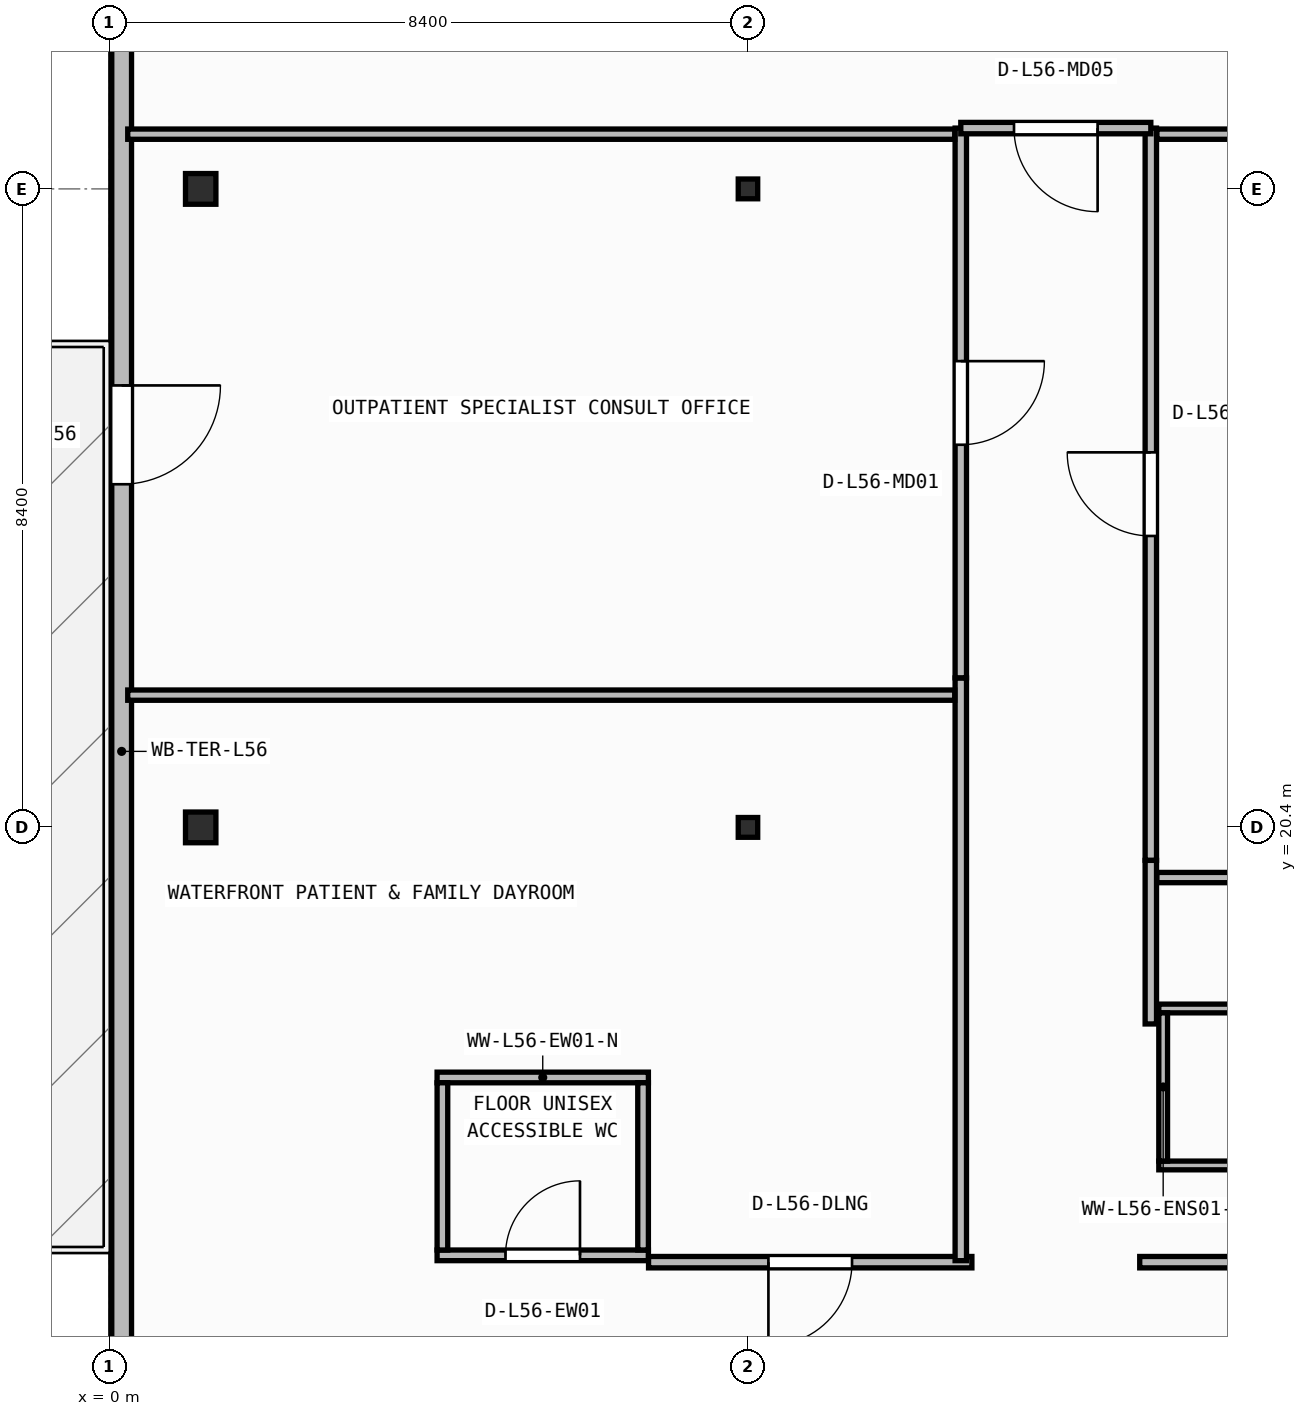
"""IFC4 building model, lengths in metres.
Left out: names, types, materials, properties, quantities, classifications, styles, units other than length and angle.
Written with IfcOpenShell. Run it as: python <this file> out.ifc"""

import sys

from ifc_helpers import new_model, si_unit, direction, frame, frame_2d, origin, origin_2d, place, context, subcontext, project, spatial, rectangle, i_section, extrude, element, fill, save


model = new_model("IFC4")
c1 = context("Model", 3, precision=1e-05, world=origin(), true_north=direction((0.0, 1.0)))
c2 = subcontext(c1, "Body", "Model", "MODEL_VIEW")
j1 = project(units=[si_unit("LENGTHUNIT", "METRE"), si_unit("PLANEANGLEUNIT", "RADIAN")], contexts=[c1])
p1 = place(None, origin())
s1 = spatial("IfcSite", under=j1, at=p1, CompositionType="ELEMENT")
p2 = place(p1, origin())
s2 = spatial("IfcBuilding", under=s1, at=p2, CompositionType="ELEMENT")
p3 = place(p2, frame((0.0, 0.0, 227.65)))
s3 = spatial("IfcBuildingStorey", under=s2, at=p3, CompositionType="ELEMENT", Elevation=227.65)
p4 = place(p3, frame((1.2, 20.4, 0.0), z_axis=(0.0, 0.0, 1.0), x_axis=(1.0, 0.0, 0.0)))
e1 = element("IfcColumn", 1, at=p4, inside=s3, PredefinedType="COLUMN", context=c2, shape_type="SweptSolid", body=[
    extrude(i_section(OverallWidth=0.4, OverallDepth=0.404, WebThickness=0.02, FlangeThickness=0.032, at=origin_2d()), origin(), (0.0, 0.0, 1.0), 3.95),
])
p5 = place(p3, frame((8.4, 20.4, 0.0), z_axis=(0.0, 0.0, 1.0), x_axis=(1.0, 0.0, 0.0)))
e2 = element("IfcColumn", 2, at=p5, inside=s3, PredefinedType="COLUMN", context=c2, shape_type="SweptSolid", body=[
    extrude(i_section(OverallWidth=0.256, OverallDepth=0.26, WebThickness=0.01, FlangeThickness=0.017, FilletRadius=0.013, at=origin_2d()), origin(), (0.0, 0.0, 1.0), 3.95),
])
p6 = place(p3, frame((1.2, 28.8, 0.0), z_axis=(0.0, 0.0, 1.0), x_axis=(1.0, 0.0, 0.0)))
e3 = element("IfcColumn", 3, at=p6, inside=s3, PredefinedType="COLUMN", context=c2, shape_type="SweptSolid", body=[
    extrude(i_section(OverallWidth=0.4, OverallDepth=0.404, WebThickness=0.02, FlangeThickness=0.032, at=origin_2d()), origin(), (0.0, 0.0, 1.0), 3.95),
])
p7 = place(p3, frame((8.4, 28.8, 0.0), z_axis=(0.0, 0.0, 1.0), x_axis=(1.0, 0.0, 0.0)))
e4 = element("IfcColumn", 4, at=p7, inside=s3, PredefinedType="COLUMN", context=c2, shape_type="SweptSolid", body=[
    extrude(i_section(OverallWidth=0.256, OverallDepth=0.26, WebThickness=0.01, FlangeThickness=0.017, FilletRadius=0.013, at=origin_2d()), origin(), (0.0, 0.0, 1.0), 3.95),
])
p8 = place(p3, frame((0.16, 40.14, 0.0), z_axis=(0.0, 0.0, 1.0), x_axis=(0.0, -1.0, 0.0)))
e5 = element("IfcWall", 5, at=p8, inside=s3, PredefinedType="STANDARD", context=c2, shape_type="SweptSolid", body=[
    extrude(rectangle(XDim=37.48, YDim=0.26, at=frame_2d((18.74, 0.0))), origin(), (0.0, 0.0, 1.0), 3.71),
])
p9 = place(p8, frame((13.926, 0.0, 0.0)))
e6 = element("IfcOpeningElement", 6, at=p9, cuts=e5, PredefinedType="OPENING", context=c2, shape_type="SweptSolid", body=[
    extrude(rectangle(XDim=1.3, YDim=2.15, at=frame_2d((0.65, 1.075))), frame((0.0, 0.14, 0.0), z_axis=(0.0, -1.0, 0.0), x_axis=(1.0, 0.0, 0.0)), (0.0, 0.0, 1.0), 0.28),
])
p10 = place(p3, frame((4.31, 14.77, 0.0), z_axis=(0.0, 0.0, 1.0), x_axis=(1.0, 0.0, 0.0)))
e7 = element("IfcWall", 7, at=p10, inside=s3, PredefinedType="PARTITIONING", context=c2, shape_type="SweptSolid", body=[
    extrude(rectangle(XDim=2.78, YDim=0.14, at=frame_2d((1.39, 0.0))), origin(), (0.0, 0.0, 1.0), 3.71),
])
p11 = place(p10, frame((0.9, 0.0, 0.0)))
e8 = element("IfcOpeningElement", 8, at=p11, cuts=e7, PredefinedType="OPENING", context=c2, shape_type="SweptSolid", body=[
    extrude(rectangle(XDim=0.98, YDim=2.1, at=frame_2d((0.49, 1.05))), frame((0.0, 0.08, 0.0), z_axis=(0.0, -1.0, 0.0), x_axis=(1.0, 0.0, 0.0)), (0.0, 0.0, 1.0), 0.16),
])
p12 = place(p3, frame((4.31, 17.11, 0.0), z_axis=(0.0, 0.0, 1.0), x_axis=(1.0, 0.0, 0.0)))
e9 = element("IfcWall", 9, at=p12, inside=s3, PredefinedType="PARTITIONING", context=c2, shape_type="SweptSolid", body=[
    extrude(rectangle(XDim=2.78, YDim=0.14, at=frame_2d((1.39, 0.0))), origin(), (0.0, 0.0, 1.0), 3.71),
])
for number, where, z_axis, x_axis in (
    (10, (4.38, 14.84, 0.0), (0.0, 0.0, 1.0), (0.0, 1.0, 0.0)),
    (11, (7.02, 14.84, 0.0), (0.0, 0.0, 1.0), (0.0, 1.0, 0.0)),
):
    element("IfcWall", number, at=place(p3, frame(where, z_axis=z_axis, x_axis=x_axis)), inside=s3, PredefinedType="PARTITIONING", context=c2, shape_type="SweptSolid", body=[
        extrude(rectangle(XDim=2.2, YDim=0.14, at=frame_2d((1.1, 0.0))), origin(), (0.0, 0.0, 1.0), 3.71),
    ])
for number, where, z_axis, x_axis in (
    (12, (13.805, 15.952, 0.0), (0.0, 0.0, 1.0), (1.0, 0.0, 0.0)),
    (13, (13.805, 18.018, 0.0), (0.0, 0.0, 1.0), (1.0, 0.0, 0.0)),
):
    element("IfcWall", number, at=place(p3, frame(where, z_axis=z_axis, x_axis=x_axis)), inside=s3, PredefinedType="PARTITIONING", context=c2, shape_type="SweptSolid", body=[
        extrude(rectangle(XDim=2.15, YDim=0.115, at=frame_2d((1.075, 0.0))), origin(), (0.0, 0.0, 1.0), 3.71),
    ])
p13 = place(p3, frame((13.863, 16.01, 0.0), z_axis=(0.0, 0.0, 1.0), x_axis=(0.0, 1.0, 0.0)))
e14 = element("IfcWall", 14, at=p13, inside=s3, PredefinedType="PARTITIONING", context=c2, shape_type="SweptSolid", body=[
    extrude(rectangle(XDim=1.95, YDim=0.115, at=frame_2d((0.975, 0.0))), origin(), (0.0, 0.0, 1.0), 3.71),
])
p14 = place(p3, frame((11.346, 14.68, 0.0), z_axis=(0.0, 0.0, 1.0), x_axis=(-1.0, 0.0, 0.0)))
e15 = element("IfcWall", 15, at=p14, inside=s3, PredefinedType="PARTITIONING", context=c2, shape_type="SweptSolid", body=[
    extrude(rectangle(XDim=4.254, YDim=0.15, at=frame_2d((2.127, 0.0))), origin(), (0.0, 0.0, 1.0), 3.71),
])
p15 = place(p14, frame((1.577, 0.0, 0.0)))
e16 = element("IfcOpeningElement", 16, at=p15, cuts=e15, PredefinedType="OPENING", context=c2, shape_type="SweptSolid", body=[
    extrude(rectangle(XDim=1.1, YDim=2.1, at=frame_2d((0.55, 1.05))), frame((0.0, 0.085, 0.0), z_axis=(0.0, -1.0, 0.0), x_axis=(1.0, 0.0, 0.0)), (0.0, 0.0, 1.0), 0.17),
])
p16 = place(p3, frame((18.266, 14.68, 0.0), z_axis=(0.0, 0.0, 1.0), x_axis=(-1.0, 0.0, 0.0)))
e17 = element("IfcWall", 17, at=p16, inside=s3, PredefinedType="PARTITIONING", context=c2, shape_type="SweptSolid", body=[
    extrude(rectangle(XDim=4.712, YDim=0.15, at=frame_2d((2.356, 0.0))), origin(), (0.0, 0.0, 1.0), 3.71),
])
p17 = place(p16, frame((1.706, 0.0, 0.0)))
e18 = element("IfcOpeningElement", 18, at=p17, cuts=e17, PredefinedType="OPENING", context=c2, shape_type="SweptSolid", body=[
    extrude(rectangle(XDim=1.3, YDim=2.15, at=frame_2d((0.65, 1.075))), frame((0.0, 0.085, 0.0), z_axis=(0.0, -1.0, 0.0), x_axis=(1.0, 0.0, 0.0)), (0.0, 0.0, 1.0), 0.17),
])
p18 = place(p3, frame((11.2, 22.366, 0.0), z_axis=(0.0, 0.0, 1.0), x_axis=(0.0, -1.0, 0.0)))
e19 = element("IfcWall", 19, at=p18, inside=s3, PredefinedType="PARTITIONING", context=c2, shape_type="SweptSolid", body=[
    extrude(rectangle(XDim=7.666, YDim=0.15, at=frame_2d((3.833, 0.0))), origin(), (0.0, 0.0, 1.0), 3.71),
])
p19 = place(p3, frame((11.2, 29.6, 0.0), z_axis=(0.0, 0.0, 1.0), x_axis=(0.0, -1.0, 0.0)))
e20 = element("IfcWall", 20, at=p19, inside=s3, PredefinedType="PARTITIONING", context=c2, shape_type="SweptSolid", body=[
    extrude(rectangle(XDim=7.232, YDim=0.15, at=frame_2d((3.616, 0.0))), origin(), (0.0, 0.0, 1.0), 3.71),
])
p20 = place(p19, frame((3.066, 0.0, 0.0)))
e21 = element("IfcOpeningElement", 21, at=p20, cuts=e20, PredefinedType="OPENING", context=c2, shape_type="SweptSolid", body=[
    extrude(rectangle(XDim=1.1, YDim=2.1, at=frame_2d((0.55, 1.05))), frame((0.0, 0.085, 0.0), z_axis=(0.0, -1.0, 0.0), x_axis=(1.0, 0.0, 0.0)), (0.0, 0.0, 1.0), 0.17),
])
p21 = place(p3, frame((13.7, 17.814, 0.0), z_axis=(0.0, 0.0, 1.0), x_axis=(0.0, 1.0, 0.0)))
e22 = element("IfcWall", 22, at=p21, inside=s3, PredefinedType="PARTITIONING", context=c2, shape_type="SweptSolid", body=[
    extrude(rectangle(XDim=2.152, YDim=0.15, at=frame_2d((1.076, 0.0))), origin(), (0.0, 0.0, 1.0), 3.71),
])
p22 = place(p3, frame((13.7, 19.968, 0.0), z_axis=(0.0, 0.0, 1.0), x_axis=(0.0, 1.0, 0.0)))
e23 = element("IfcWall", 23, at=p22, inside=s3, PredefinedType="PARTITIONING", context=c2, shape_type="SweptSolid", body=[
    extrude(rectangle(XDim=9.632, YDim=0.15, at=frame_2d((4.816, 0.0))), origin(), (0.0, 0.0, 1.0), 3.71),
])
p23 = place(p22, frame((4.266, 0.0, 0.0)))
e24 = element("IfcOpeningElement", 24, at=p23, cuts=e23, PredefinedType="OPENING", context=c2, shape_type="SweptSolid", body=[
    extrude(rectangle(XDim=1.1, YDim=2.1, at=frame_2d((0.55, 1.05))), frame((0.0, 0.085, 0.0), z_axis=(0.0, -1.0, 0.0), x_axis=(1.0, 0.0, 0.0)), (0.0, 0.0, 1.0), 0.17),
])
p24 = place(p3, frame((13.7, 29.6, 0.0), z_axis=(0.0, 0.0, 1.0), x_axis=(-1.0, 0.0, 0.0)))
e25 = element("IfcWall", 25, at=p24, inside=s3, PredefinedType="PARTITIONING", context=c2, shape_type="SweptSolid", body=[
    extrude(rectangle(XDim=2.5, YDim=0.15, at=frame_2d((1.25, 0.0))), origin(), (0.0, 0.0, 1.0), 3.71),
])
p25 = place(p24, frame((0.7, 0.0, 0.0)))
e26 = element("IfcOpeningElement", 26, at=p25, cuts=e25, PredefinedType="OPENING", context=c2, shape_type="SweptSolid", body=[
    extrude(rectangle(XDim=1.1, YDim=2.1, at=frame_2d((0.55, 1.05))), frame((0.0, 0.085, 0.0), z_axis=(0.0, -1.0, 0.0), x_axis=(1.0, 0.0, 0.0)), (0.0, 0.0, 1.0), 0.17),
])
for number, where, z_axis, x_axis in (
    (27, (11.12, 22.14, 0.0), (0.0, 0.0, 1.0), (-1.0, 0.0, 0.0)),
    (28, (11.12, 29.52, 0.0), (0.0, 0.0, 1.0), (-1.0, 0.0, 0.0)),
):
    element("IfcWall", number, at=place(p3, frame(where, z_axis=z_axis, x_axis=x_axis)), inside=s3, PredefinedType="PARTITIONING", context=c2, shape_type="SweptSolid", body=[
        extrude(rectangle(XDim=10.88, YDim=0.135, at=frame_2d((5.44, 0.0))), origin(), (0.0, 0.0, 1.0), 3.71),
    ])
p26 = place(p3, frame((18.04, 19.74, 0.0), z_axis=(0.0, 0.0, 1.0), x_axis=(-1.0, 0.0, 0.0)))
e29 = element("IfcWall", 29, at=p26, inside=s3, PredefinedType="PARTITIONING", context=c2, shape_type="SweptSolid", body=[
    extrude(rectangle(XDim=4.26, YDim=0.135, at=frame_2d((2.13, 0.0))), origin(), (0.0, 0.0, 1.0), 3.71),
])
p27 = place(p3, frame((22.185, 29.52, 0.0), z_axis=(0.0, 0.0, 1.0), x_axis=(-1.0, 0.0, 0.0)))
e30 = element("IfcWall", 30, at=p27, inside=s3, PredefinedType="PARTITIONING", context=c2, shape_type="SweptSolid", body=[
    extrude(rectangle(XDim=8.405, YDim=0.135, at=frame_2d((4.202, 0.0))), origin(), (0.0, 0.0, 1.0), 3.71),
])
p28 = place(p9, origin())
e31 = element("IfcDoor", 31, at=p28, inside=s3, OperationType="SINGLE_SWING_LEFT", PredefinedType="DOOR", context=c2, shape_type="SweptSolid", body=[
    extrude(rectangle(XDim=1.3, YDim=2.15, at=frame_2d((0.65, 1.075))), frame((0.0, 0.025, 0.0), z_axis=(0.0, -1.0, 0.0), x_axis=(1.0, 0.0, 0.0)), (0.0, 0.0, 1.0), 0.05),
])
fill(e6, e31)
p29 = place(p11, origin())
e32 = element("IfcDoor", 32, at=p29, inside=s3, OperationType="SINGLE_SWING_RIGHT", PredefinedType="DOOR", context=c2, shape_type="SweptSolid", body=[
    extrude(rectangle(XDim=0.98, YDim=2.1, at=frame_2d((0.49, 1.05))), frame((0.0, 0.025, 0.0), z_axis=(0.0, -1.0, 0.0), x_axis=(1.0, 0.0, 0.0)), (0.0, 0.0, 1.0), 0.05),
])
fill(e8, e32)
p30 = place(p15, origin())
e33 = element("IfcDoor", 33, at=p30, inside=s3, OperationType="SINGLE_SWING_RIGHT", PredefinedType="DOOR", context=c2, shape_type="SweptSolid", body=[
    extrude(rectangle(XDim=1.1, YDim=2.1, at=frame_2d((0.55, 1.05))), frame((0.0, 0.025, 0.0), z_axis=(0.0, -1.0, 0.0), x_axis=(1.0, 0.0, 0.0)), (0.0, 0.0, 1.0), 0.05),
])
fill(e16, e33)
p31 = place(p20, origin())
e34 = element("IfcDoor", 34, at=p31, inside=s3, OperationType="SINGLE_SWING_LEFT", PredefinedType="DOOR", context=c2, shape_type="SweptSolid", body=[
    extrude(rectangle(XDim=1.1, YDim=2.1, at=frame_2d((0.55, 1.05))), frame((0.0, 0.025, 0.0), z_axis=(0.0, -1.0, 0.0), x_axis=(1.0, 0.0, 0.0)), (0.0, 0.0, 1.0), 0.05),
])
fill(e21, e34)
p32 = place(p23, origin())
e35 = element("IfcDoor", 35, at=p32, inside=s3, OperationType="SINGLE_SWING_RIGHT", PredefinedType="DOOR", context=c2, shape_type="SweptSolid", body=[
    extrude(rectangle(XDim=1.1, YDim=2.1, at=frame_2d((0.55, 1.05))), frame((0.0, 0.025, 0.0), z_axis=(0.0, -1.0, 0.0), x_axis=(1.0, 0.0, 0.0)), (0.0, 0.0, 1.0), 0.05),
])
fill(e24, e35)
p33 = place(p25, origin())
e36 = element("IfcDoor", 36, at=p33, inside=s3, OperationType="SINGLE_SWING_LEFT", PredefinedType="DOOR", context=c2, shape_type="SweptSolid", body=[
    extrude(rectangle(XDim=1.1, YDim=2.1, at=frame_2d((0.55, 1.05))), frame((0.0, 0.025, 0.0), z_axis=(0.0, -1.0, 0.0), x_axis=(1.0, 0.0, 0.0)), (0.0, 0.0, 1.0), 0.05),
])
fill(e26, e36)
save(model, sys.argv[1])
